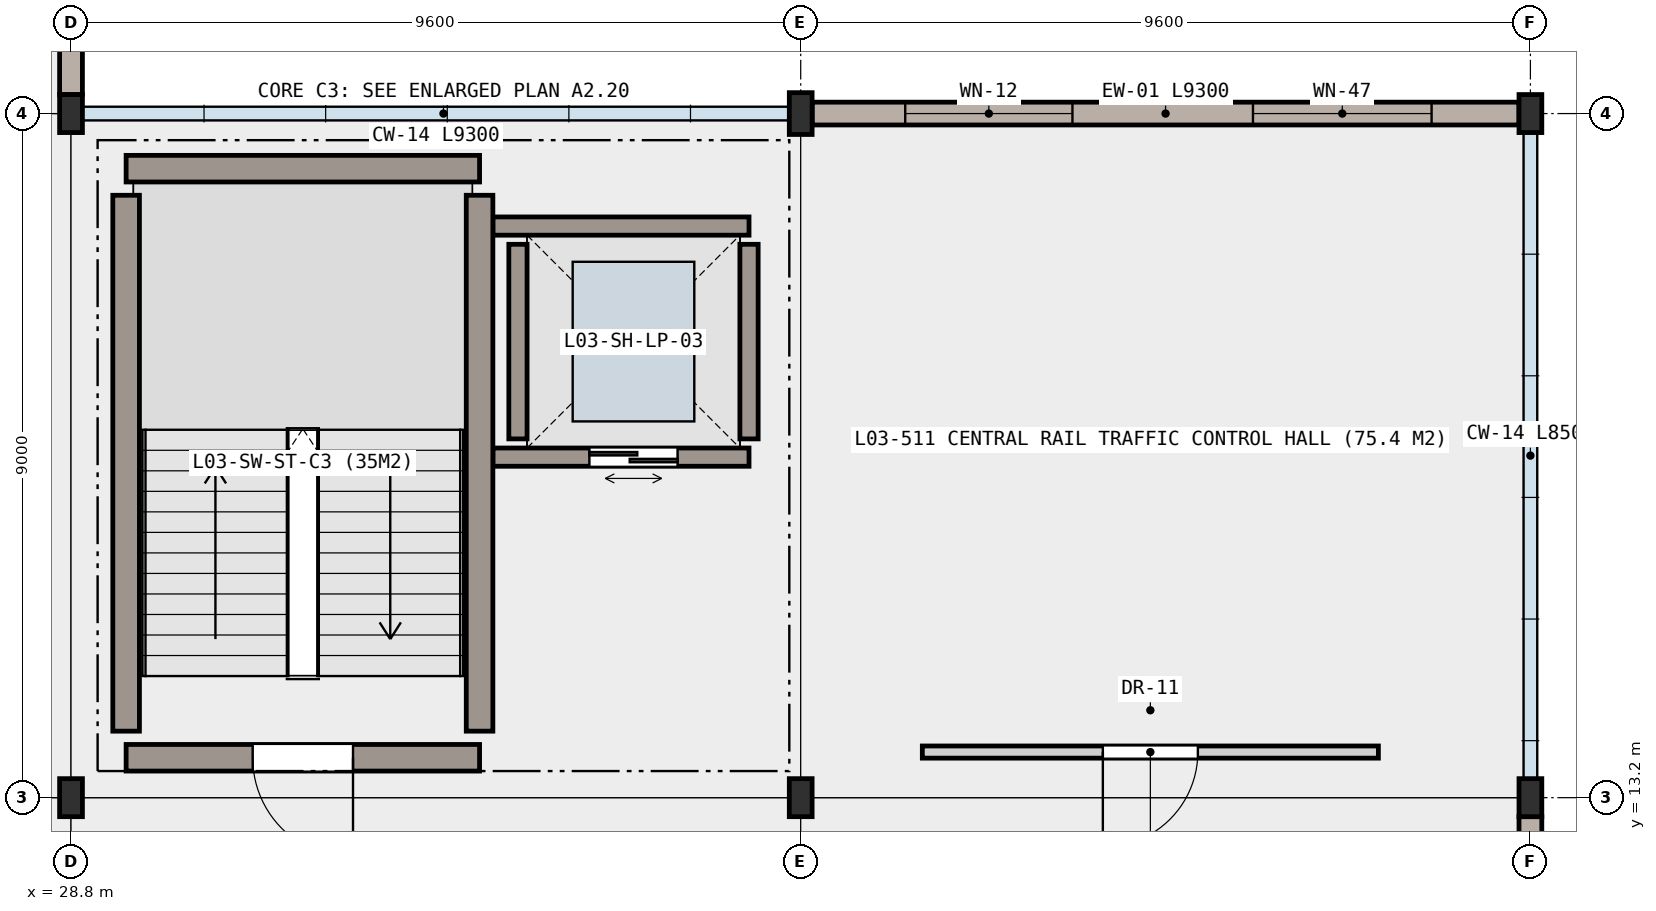
"""IFC4 building model, lengths in metres.
Left out: names, types, materials, properties, quantities, classifications, styles, units other than length and angle.
Written with IfcOpenShell. Run it as: python <this file> out.ifc"""

import sys

from ifc_helpers import new_model, si_unit, direction, frame, frame_2d, origin, origin_2d, place, context, subcontext, project, spatial, rectangle, i_section, extrude, element, fill, save


model = new_model("IFC4")
c1 = context("Model", 3, precision=1e-05, world=origin(), true_north=direction((0.0, 1.0)))
c2 = subcontext(c1, "Body", "Model", "MODEL_VIEW")
j1 = project(units=[si_unit("LENGTHUNIT", "METRE"), si_unit("PLANEANGLEUNIT", "RADIAN")], contexts=[c1])
p1 = place(None, origin())
s1 = spatial("IfcSite", under=j1, at=p1, CompositionType="ELEMENT")
p2 = place(p1, origin())
s2 = spatial("IfcBuilding", under=s1, at=p2, CompositionType="ELEMENT")
p3 = place(p2, frame((0.0, 0.0, 14.4)))
s3 = spatial("IfcBuildingStorey", under=s2, at=p3, CompositionType="ELEMENT", Elevation=14.4)
for number, where, z_axis, x_axis in (
    (1, (28.8, 13.2, 0.0), (0.0, 0.0, 1.0), (1.0, 0.0, 0.0)),
    (2, (28.8, 22.2, 0.0), (0.0, 0.0, 1.0), (1.0, 0.0, 0.0)),
    (3, (38.4, 13.2, 0.0), (0.0, 0.0, 1.0), (1.0, 0.0, 0.0)),
):
    element("IfcColumn", number, at=place(p3, frame(where, z_axis=z_axis, x_axis=x_axis)), inside=s3, PredefinedType="COLUMN", context=c2, shape_type="SweptSolid", body=[
        extrude(i_section(OverallWidth=0.3, OverallDepth=0.5, WebThickness=0.014, FlangeThickness=0.028, FilletRadius=0.027, at=origin_2d()), origin(), (0.0, 0.0, 1.0), 4.2),
    ])
p4 = place(p3, frame((38.4, 22.2, 0.0), z_axis=(0.0, 0.0, 1.0), x_axis=(1.0, 0.0, 0.0)))
e4 = element("IfcColumn", 4, at=p4, inside=s3, PredefinedType="COLUMN", context=c2, shape_type="SweptSolid", body=[
    extrude(i_section(OverallWidth=0.3, OverallDepth=0.55, WebThickness=0.015, FlangeThickness=0.029, FilletRadius=0.027, at=origin_2d()), origin(), (0.0, 0.0, 1.0), 4.2),
])
for number, where, z_axis, x_axis in (
    (5, (48.0, 13.2, 0.0), (0.0, 0.0, 1.0), (1.0, 0.0, 0.0)),
    (6, (48.0, 22.2, 0.0), (0.0, 0.0, 1.0), (1.0, 0.0, 0.0)),
):
    element("IfcColumn", number, at=place(p3, frame(where, z_axis=z_axis, x_axis=x_axis)), inside=s3, PredefinedType="COLUMN", context=c2, shape_type="SweptSolid", body=[
        extrude(i_section(OverallWidth=0.3, OverallDepth=0.5, WebThickness=0.014, FlangeThickness=0.028, FilletRadius=0.027, at=origin_2d()), origin(), (0.0, 0.0, 1.0), 4.2),
    ])
p5 = place(p3, frame((28.8, 30.95, 0.0), z_axis=(0.0, 0.0, 1.0), x_axis=(0.0, -1.0, 0.0)))
e7 = element("IfcWall", 7, at=p5, inside=s3, PredefinedType="SOLIDWALL", context=c2, shape_type="SweptSolid", body=[
    extrude(rectangle(XDim=8.5, YDim=0.3, at=frame_2d((4.25, 0.0))), origin(), (0.0, 0.0, 1.0), 3.4),
])
p6 = place(p5, frame((1.025, 0.0, 0.85)))
e8 = element("IfcOpeningElement", 8, at=p6, cuts=e7, PredefinedType="OPENING", context=c2, shape_type="SweptSolid", body=[
    extrude(rectangle(XDim=2.2, YDim=1.5, at=frame_2d((1.1, 0.75))), frame((0.0, 0.16, 0.0), z_axis=(0.0, -1.0, 0.0), x_axis=(1.0, 0.0, 0.0)), (0.0, 0.0, 1.0), 0.32),
])
p7 = place(p5, frame((5.275, 0.0, 0.85)))
e9 = element("IfcOpeningElement", 9, at=p7, cuts=e7, PredefinedType="OPENING", context=c2, shape_type="SweptSolid", body=[
    extrude(rectangle(XDim=2.2, YDim=1.85, at=frame_2d((1.1, 0.925))), frame((0.0, 0.16, 0.0), z_axis=(0.0, -1.0, 0.0), x_axis=(1.0, 0.0, 0.0)), (0.0, 0.0, 1.0), 0.32),
])
p8 = place(p3, frame((38.55, 22.2, 0.0), z_axis=(0.0, 0.0, 1.0), x_axis=(1.0, 0.0, 0.0)))
e10 = element("IfcWall", 10, at=p8, inside=s3, PredefinedType="SOLIDWALL", context=c2, shape_type="SweptSolid", body=[
    extrude(rectangle(XDim=9.3, YDim=0.3, at=frame_2d((4.65, 0.0))), origin(), (0.0, 0.0, 1.0), 3.33),
])
p9 = place(p8, frame((1.225, 0.0, 0.85)))
e11 = element("IfcOpeningElement", 11, at=p9, cuts=e10, PredefinedType="OPENING", context=c2, shape_type="SweptSolid", body=[
    extrude(rectangle(XDim=2.2, YDim=2.15, at=frame_2d((1.1, 1.075))), frame((0.0, 0.16, 0.0), z_axis=(0.0, -1.0, 0.0), x_axis=(1.0, 0.0, 0.0)), (0.0, 0.0, 1.0), 0.32),
])
p10 = place(p8, frame((5.8, 0.0, 0.85)))
e12 = element("IfcOpeningElement", 12, at=p10, cuts=e10, PredefinedType="OPENING", context=c2, shape_type="SweptSolid", body=[
    extrude(rectangle(XDim=2.35, YDim=1.5, at=frame_2d((1.175, 0.75))), frame((0.0, 0.16, 0.0), z_axis=(0.0, -1.0, 0.0), x_axis=(1.0, 0.0, 0.0)), (0.0, 0.0, 1.0), 0.32),
])
p11 = place(p3, frame((48.0, 12.95, 0.0), z_axis=(0.0, 0.0, 1.0), x_axis=(0.0, -1.0, 0.0)))
e13 = element("IfcWall", 13, at=p11, inside=s3, PredefinedType="SOLIDWALL", context=c2, shape_type="SweptSolid", body=[
    extrude(rectangle(XDim=6.1, YDim=0.3, at=frame_2d((3.05, 0.0))), origin(), (0.0, 0.0, 1.0), 3.43),
])
p12 = place(p11, frame((1.875, 0.0, 0.85)))
e14 = element("IfcOpeningElement", 14, at=p12, cuts=e13, PredefinedType="OPENING", context=c2, shape_type="SweptSolid", body=[
    extrude(rectangle(XDim=2.35, YDim=1.85, at=frame_2d((1.175, 0.925))), frame((0.0, 0.16, 0.0), z_axis=(0.0, -1.0, 0.0), x_axis=(1.0, 0.0, 0.0)), (0.0, 0.0, 1.0), 0.32),
])
p13 = place(p3, frame((37.72, 17.68, 0.0), z_axis=(0.0, 0.0, 1.0), x_axis=(-1.0, 0.0, 0.0)))
e15 = element("IfcWall", 15, at=p13, inside=s3, PredefinedType="SHEAR", context=c2, shape_type="SweptSolid", body=[
    extrude(rectangle(XDim=3.37, YDim=0.24, at=frame_2d((1.685, 0.0))), origin(), (0.0, 0.0, 1.0), 3.96),
])
p14 = place(p13, frame((0.94, 0.0, 0.0)))
e16 = element("IfcOpeningElement", 16, at=p14, cuts=e15, PredefinedType="OPENING", context=c2, shape_type="SweptSolid", body=[
    extrude(rectangle(XDim=1.16, YDim=2.15, at=frame_2d((0.58, 1.075))), frame((0.0, 0.13, 0.0), z_axis=(0.0, -1.0, 0.0), x_axis=(1.0, 0.0, 0.0)), (0.0, 0.0, 1.0), 0.26),
])
p15 = place(p3, frame((34.35, 20.72, 0.0), z_axis=(0.0, 0.0, 1.0), x_axis=(1.0, 0.0, 0.0)))
e17 = element("IfcWall", 17, at=p15, inside=s3, PredefinedType="SHEAR", context=c2, shape_type="SweptSolid", body=[
    extrude(rectangle(XDim=3.37, YDim=0.24, at=frame_2d((1.685, 0.0))), origin(), (0.0, 0.0, 1.0), 3.96),
])
for number, where, z_axis, x_axis in (
    (18, (34.68, 17.92, 0.0), (0.0, 0.0, 1.0), (0.0, 1.0, 0.0)),
    (19, (37.72, 20.48, 0.0), (0.0, 0.0, 1.0), (0.0, -1.0, 0.0)),
):
    element("IfcWall", number, at=place(p3, frame(where, z_axis=z_axis, x_axis=x_axis)), inside=s3, PredefinedType="SHEAR", context=c2, shape_type="SweptSolid", body=[
        extrude(rectangle(XDim=2.56, YDim=0.24, at=frame_2d((1.28, 0.0))), origin(), (0.0, 0.0, 1.0), 3.96),
    ])
p16 = place(p3, frame((34.175, 13.725, 0.0), z_axis=(0.0, 0.0, 1.0), x_axis=(-1.0, 0.0, 0.0)))
e20 = element("IfcWall", 20, at=p16, inside=s3, PredefinedType="SHEAR", context=c2, shape_type="SweptSolid", body=[
    extrude(rectangle(XDim=4.65, YDim=0.35, at=frame_2d((2.325, 0.0))), origin(), (0.0, 0.0, 1.0), 3.96),
])
p17 = place(p16, frame((1.665, 0.0, 0.0)))
e21 = element("IfcOpeningElement", 21, at=p17, cuts=e20, PredefinedType="OPENING", context=c2, shape_type="SweptSolid", body=[
    extrude(rectangle(XDim=1.32, YDim=2.15, at=frame_2d((0.66, 1.075))), frame((0.0, 0.185, 0.0), z_axis=(0.0, -1.0, 0.0), x_axis=(1.0, 0.0, 0.0)), (0.0, 0.0, 1.0), 0.37),
])
p18 = place(p3, frame((29.525, 21.475, 0.0), z_axis=(0.0, 0.0, 1.0), x_axis=(1.0, 0.0, 0.0)))
e22 = element("IfcWall", 22, at=p18, inside=s3, PredefinedType="SHEAR", context=c2, shape_type="SweptSolid", body=[
    extrude(rectangle(XDim=4.65, YDim=0.35, at=frame_2d((2.325, 0.0))), origin(), (0.0, 0.0, 1.0), 3.96),
])
for number, where, z_axis, x_axis in (
    (23, (29.525, 14.075, 0.0), (0.0, 0.0, 1.0), (0.0, 1.0, 0.0)),
    (24, (34.175, 21.125, 0.0), (0.0, 0.0, 1.0), (0.0, -1.0, 0.0)),
):
    element("IfcWall", number, at=place(p3, frame(where, z_axis=z_axis, x_axis=x_axis)), inside=s3, PredefinedType="SHEAR", context=c2, shape_type="SweptSolid", body=[
        extrude(rectangle(XDim=7.05, YDim=0.35, at=frame_2d((3.525, 0.0))), origin(), (0.0, 0.0, 1.0), 3.96),
    ])
p19 = place(p3, frame((46.0, 13.8, 0.0), z_axis=(0.0, 0.0, 1.0), x_axis=(-1.0, 0.0, 0.0)))
e25 = element("IfcWall", 25, at=p19, inside=s3, PredefinedType="PARTITIONING", context=c2, shape_type="SweptSolid", body=[
    extrude(rectangle(XDim=6.0, YDim=0.16, at=frame_2d((3.0, 0.0))), origin(), (0.0, 0.0, 1.0), 3.96),
])
p20 = place(p19, frame((2.375, 0.0, 0.0)))
e26 = element("IfcOpeningElement", 26, at=p20, cuts=e25, PredefinedType="OPENING", context=c2, shape_type="SweptSolid", body=[
    extrude(rectangle(XDim=1.25, YDim=2.16, at=frame_2d((0.625, 1.08))), frame((0.0, 0.09, 0.0), z_axis=(0.0, -1.0, 0.0), x_axis=(1.0, 0.0, 0.0)), (0.0, 0.0, 1.0), 0.18),
])
p21 = place(p9, origin())
e27 = element("IfcWindow", 27, at=p21, inside=s3, PartitioningType="SINGLE_PANEL", PredefinedType="WINDOW", context=c2, shape_type="SweptSolid", body=[
    extrude(rectangle(XDim=2.2, YDim=2.15, at=frame_2d((1.1, 1.075))), frame((0.0, 0.03, 0.0), z_axis=(0.0, -1.0, 0.0), x_axis=(1.0, 0.0, 0.0)), (0.0, 0.0, 1.0), 0.06),
])
fill(e11, e27)
p22 = place(p10, origin())
e28 = element("IfcWindow", 28, at=p22, inside=s3, PartitioningType="SINGLE_PANEL", PredefinedType="WINDOW", context=c2, shape_type="SweptSolid", body=[
    extrude(rectangle(XDim=2.35, YDim=1.5, at=frame_2d((1.175, 0.75))), frame((0.0, 0.03, 0.0), z_axis=(0.0, -1.0, 0.0), x_axis=(1.0, 0.0, 0.0)), (0.0, 0.0, 1.0), 0.06),
])
fill(e12, e28)
p23 = place(p14, origin())
e29 = element("IfcDoor", 29, at=p23, inside=s3, OperationType="DOUBLE_DOOR_SLIDING", PredefinedType="DOOR", context=c2, shape_type="SweptSolid", body=[
    extrude(rectangle(XDim=1.16, YDim=2.15, at=frame_2d((0.58, 1.075))), frame((0.0, 0.025, 0.0), z_axis=(0.0, -1.0, 0.0), x_axis=(1.0, 0.0, 0.0)), (0.0, 0.0, 1.0), 0.05),
])
fill(e16, e29)
p24 = place(p17, origin())
e30 = element("IfcDoor", 30, at=p24, inside=s3, OperationType="SINGLE_SWING_LEFT", PredefinedType="DOOR", context=c2, shape_type="SweptSolid", body=[
    extrude(rectangle(XDim=1.32, YDim=2.15, at=frame_2d((0.66, 1.075))), frame((0.0, 0.025, 0.0), z_axis=(0.0, -1.0, 0.0), x_axis=(1.0, 0.0, 0.0)), (0.0, 0.0, 1.0), 0.05),
])
fill(e21, e30)
p25 = place(p20, origin())
e31 = element("IfcDoor", 31, at=p25, inside=s3, OperationType="SINGLE_SWING_RIGHT", PredefinedType="DOOR", context=c2, shape_type="SweptSolid", body=[
    extrude(rectangle(XDim=1.25, YDim=2.16, at=frame_2d((0.625, 1.08))), frame((0.0, 0.025, 0.0), z_axis=(0.0, -1.0, 0.0), x_axis=(1.0, 0.0, 0.0)), (0.0, 0.0, 1.0), 0.05),
])
fill(e26, e31)
save(model, sys.argv[1])
